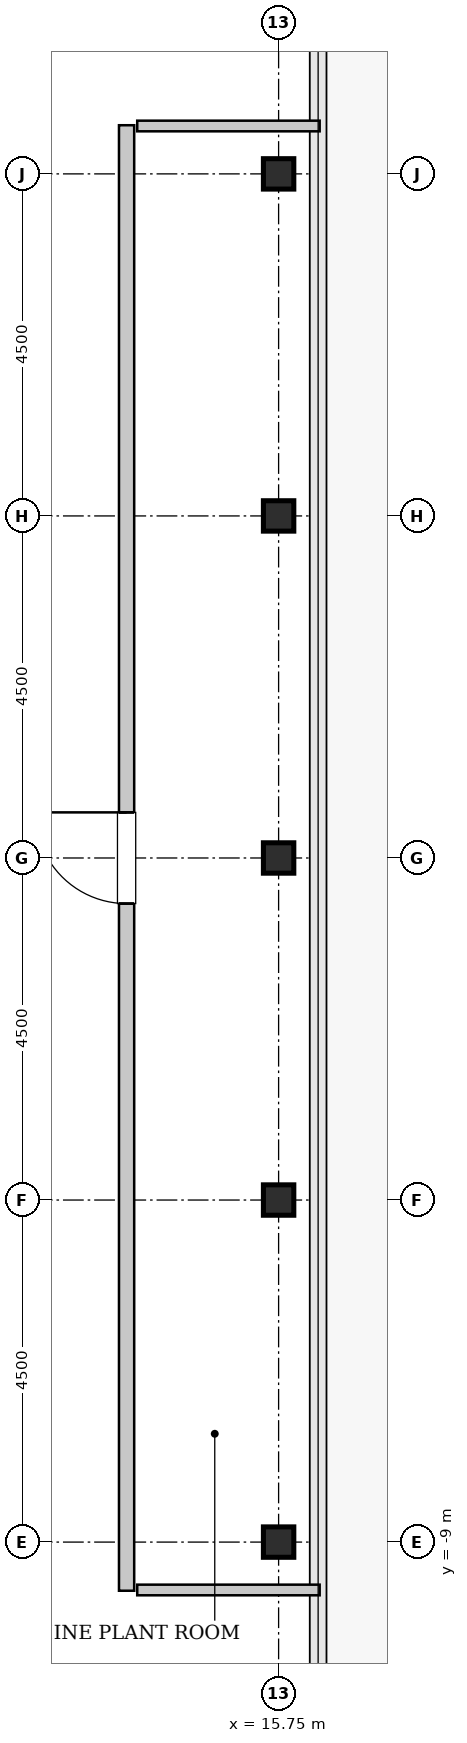
"""IFC4 building model, lengths in metres.
Left out: names, types, materials, properties, quantities, classifications, styles, units other than length and angle.
Written with IfcOpenShell. Run it as: python <this file> out.ifc"""

import sys

from ifc_helpers import new_model, si_unit, direction, frame, frame_2d, origin, origin_2d, place, context, subcontext, project, spatial, rectangle, hollow_rectangle, extrude, source, transform, mapped, element, fill, save


model = new_model("IFC4")
c1 = context("Model", 3, precision=1e-05, world=origin(), true_north=direction((0.0, 1.0)))
c2 = subcontext(c1, "Body", "Model", "MODEL_VIEW")
j1 = project(units=[si_unit("LENGTHUNIT", "METRE"), si_unit("PLANEANGLEUNIT", "RADIAN")], contexts=[c1])
p1 = place(None, origin())
s1 = spatial("IfcSite", under=j1, at=p1, CompositionType="ELEMENT")
p2 = place(p1, origin())
s2 = spatial("IfcBuilding", under=s1, at=p2, CompositionType="ELEMENT")
p3 = place(p2, frame((0.0, 0.0, 358.6)))
s3 = spatial("IfcBuildingStorey", under=s2, at=p3, CompositionType="ELEMENT", Elevation=358.6)
m1 = source(origin(), c2, "Body", "SweptSolid", [
    extrude(hollow_rectangle(XDim=0.4, YDim=0.4, WallThickness=0.02, InnerFilletRadius=0.02, OuterFilletRadius=0.04, at=origin_2d()), origin(), (0.0, 0.0, 1.0), 4.4),
])
for number, where, z_axis, x_axis in (
    (1, (15.75, -9.0, 0.0), (0.0, 0.0, 1.0), (1.0, 0.0, 0.0)),
    (2, (15.75, -4.5, 0.0), (0.0, 0.0, 1.0), (1.0, 0.0, 0.0)),
    (3, (15.75, 0.0, 0.0), (0.0, 0.0, 1.0), (1.0, 0.0, 0.0)),
    (4, (15.75, 4.5, 0.0), (0.0, 0.0, 1.0), (1.0, 0.0, 0.0)),
    (5, (15.75, 9.0, 0.0), (0.0, 0.0, 1.0), (1.0, 0.0, 0.0)),
):
    element("IfcColumn", number, at=place(p3, frame(where, z_axis=z_axis, x_axis=x_axis)), inside=s3, PredefinedType="COLUMN", context=c2, shape_type="MappedRepresentation", body=[
        mapped(m1, transform((0.0, 0.0, 0.0), x_axis=(1.0, 0.0, 0.0), y_axis=(0.0, 1.0, 0.0), z_axis=(0.0, 0.0, 1.0), scale=1.0)),
    ])
m2 = source(origin(), c2, "Body", "SweptSolid", [
    extrude(rectangle(XDim=19.28, YDim=0.2, at=frame_2d((9.64, 0.0))), origin(), (0.0, 0.0, 1.0), 4.085),
])
p4 = place(p3, frame((13.75, -9.64, 0.0), z_axis=(0.0, 0.0, 1.0), x_axis=(0.0, 1.0, 0.0)))
e6 = element("IfcWall", 6, at=p4, inside=s3, PredefinedType="SOLIDWALL", context=c2, shape_type="MappedRepresentation", body=[
    mapped(m2, transform((0.0, 0.0, 0.0), x_axis=(1.0, 0.0, 0.0), y_axis=(0.0, 1.0, 0.0), z_axis=(0.0, 0.0, 1.0), scale=1.0)),
])
p5 = place(p4, frame((9.04, 0.0, 0.0)))
e7 = element("IfcOpeningElement", 7, at=p5, cuts=e6, PredefinedType="OPENING", context=c2, shape_type="SweptSolid", body=[
    extrude(rectangle(XDim=1.2, YDim=2.15, at=frame_2d((0.6, 1.075))), frame((0.0, 0.11, 0.0), z_axis=(0.0, -1.0, 0.0), x_axis=(1.0, 0.0, 0.0)), (0.0, 0.0, 1.0), 0.22),
])
m3 = source(origin(), c2, "Body", "SweptSolid", [
    extrude(rectangle(XDim=2.4, YDim=0.14, at=frame_2d((1.2, 0.0))), origin(), (0.0, 0.0, 1.0), 4.085),
])
for number, where, z_axis, x_axis in (
    (8, (13.89, 9.63, 0.0), (0.0, 0.0, 1.0), (1.0, 0.0, 0.0)),
    (9, (13.89, -9.63, 0.0), (0.0, 0.0, 1.0), (1.0, 0.0, 0.0)),
):
    element("IfcWall", number, at=place(p3, frame(where, z_axis=z_axis, x_axis=x_axis)), inside=s3, PredefinedType="PARTITIONING", context=c2, shape_type="MappedRepresentation", body=[
        mapped(m3, transform((0.0, 0.0, 0.0), x_axis=(1.0, 0.0, 0.0), y_axis=(0.0, 1.0, 0.0), z_axis=(0.0, 0.0, 1.0), scale=1.0)),
    ])
m4 = source(origin(), c2, "Body", "SweptSolid", [
    extrude(rectangle(XDim=1.2, YDim=2.15, at=frame_2d((0.6, 1.075))), frame((0.0, 0.025, 0.0), z_axis=(0.0, -1.0, 0.0), x_axis=(1.0, 0.0, 0.0)), (0.0, 0.0, 1.0), 0.05),
])
p6 = place(p5, origin())
e10 = element("IfcDoor", 10, at=p6, inside=s3, OperationType="SINGLE_SWING_RIGHT", PredefinedType="DOOR", context=c2, shape_type="MappedRepresentation", body=[
    mapped(m4, transform((0.0, 0.0, 0.0), x_axis=(1.0, 0.0, 0.0), y_axis=(0.0, 1.0, 0.0), z_axis=(0.0, 0.0, 1.0), scale=1.0)),
])
fill(e7, e10)
save(model, sys.argv[1])
